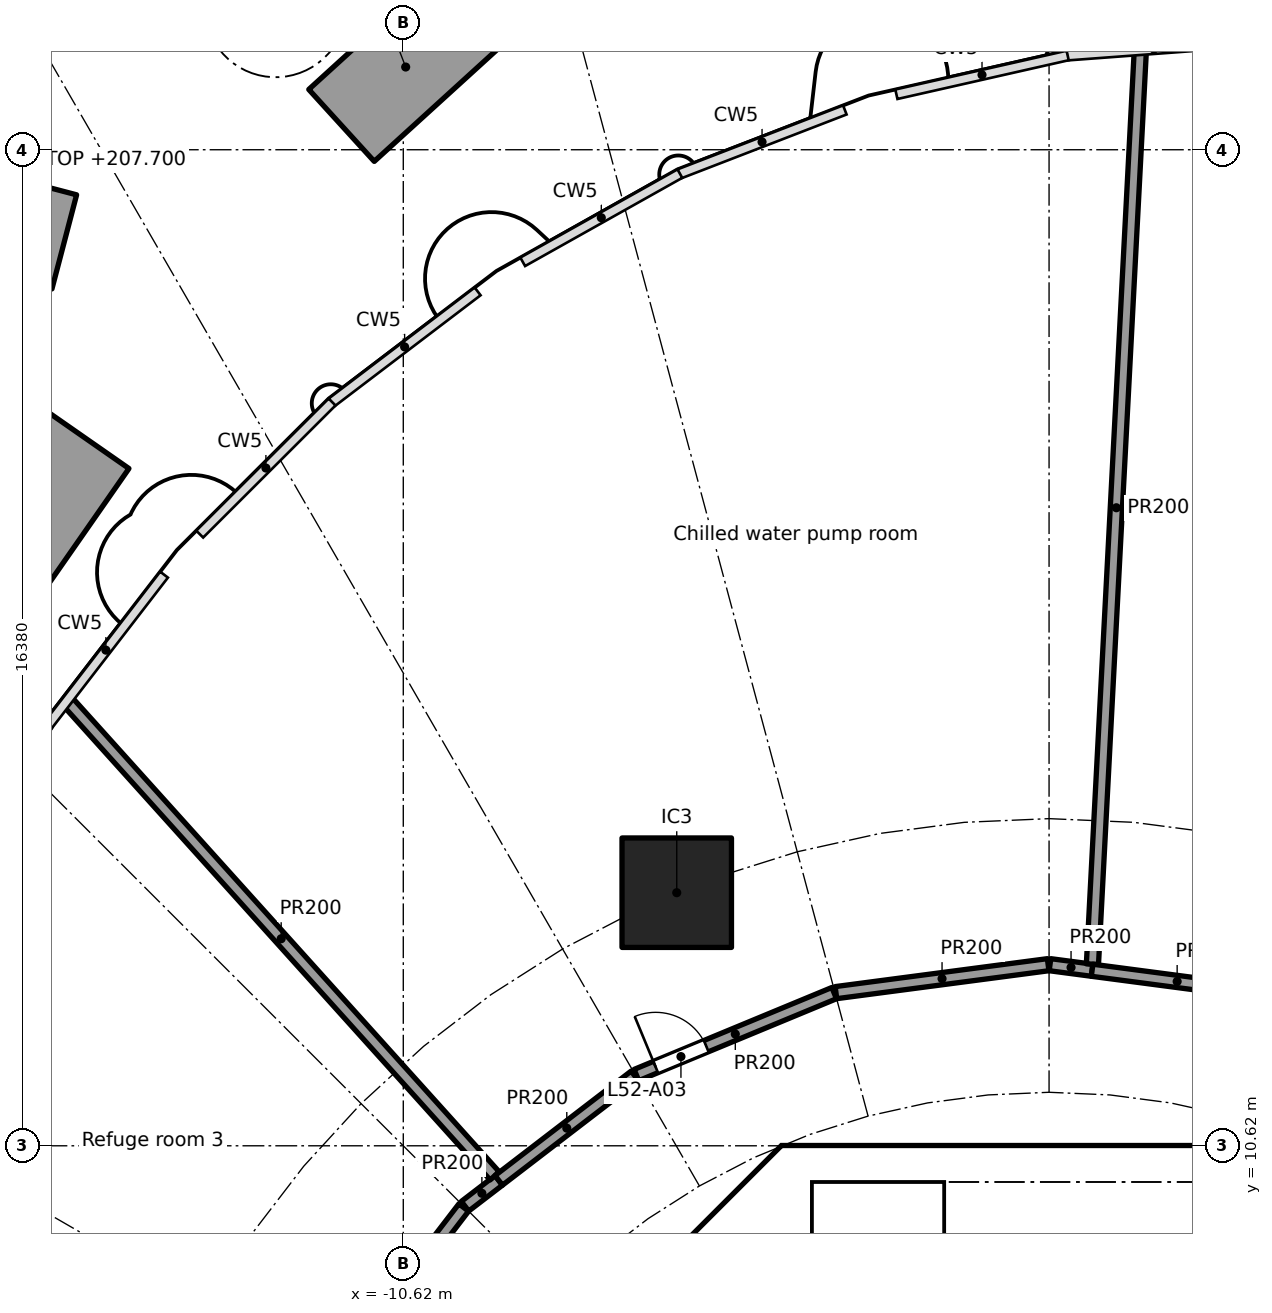
"""IFC4 building model, lengths in metres.
Left out: names, types, materials, properties, quantities, classifications, styles, units other than length and angle.
Written with IfcOpenShell. Run it as: python <this file> out.ifc"""

import sys

from ifc_helpers import new_model, si_unit, direction, frame, frame_2d, origin, origin_2d, place, context, subcontext, project, spatial, polyline, rectangle, outline, extrude, element, fill, save


model = new_model("IFC4")
c1 = context("Model", 3, precision=1e-05, world=origin(), true_north=direction((0.0, 1.0)))
c2 = subcontext(c1, "Body", "Model", "MODEL_VIEW")
j1 = project(units=[si_unit("LENGTHUNIT", "METRE"), si_unit("PLANEANGLEUNIT", "RADIAN")], contexts=[c1])
p1 = place(None, origin())
s1 = spatial("IfcSite", under=j1, at=p1, CompositionType="ELEMENT")
p2 = place(p1, origin())
s2 = spatial("IfcBuilding", under=s1, at=p2, CompositionType="ELEMENT")
p3 = place(p2, frame((0.0, 0.0, 206.6)))
s3 = spatial("IfcBuildingStorey", under=s2, at=p3, CompositionType="ELEMENT", Elevation=206.6)
p4 = place(p3, frame((-6.123, 14.782, 0.0), z_axis=(0.0, 0.0, 1.0), x_axis=(1.0, 0.0, 0.0)))
e1 = element("IfcColumn", 1, at=p4, inside=s3, PredefinedType="COLUMN", context=c2, shape_type="SweptSolid", body=[
    extrude(rectangle(XDim=1.8, YDim=1.8, at=origin_2d()), origin(), (0.0, 0.0, 1.0), 5.6),
])
p5 = place(p3, frame((-15.788, 22.215, 0.0), z_axis=(0.0, 0.0, 1.0), x_axis=(-0.571584522967, -0.82054319393, 0.0)))
e2 = element("IfcWall", 2, at=p5, inside=s3, PredefinedType="SOLIDWALL", context=c2, shape_type="SweptSolid", body=[
    extrude(rectangle(XDim=8.183, YDim=1.6, at=frame_2d((4.091, 0.0))), origin(), (0.0, 0.0, 1.0), 1.1),
])
p6 = place(p3, frame((-11.636, 27.4, 0.0), z_axis=(0.0, 0.0, 1.0), x_axis=(0.739607022458, 0.673038967914, 0.0)))
e3 = element("IfcWall", 3, at=p6, inside=s3, PredefinedType="SOLIDWALL", context=c2, shape_type="SweptSolid", body=[
    extrude(rectangle(XDim=2.853, YDim=1.6, at=frame_2d((1.427, 0.0))), origin(), (0.0, 0.0, 1.0), 1.1),
])
p7 = place(p3, frame((-17.514, 25.831, 0.0), z_axis=(0.0, 0.0, 1.0), x_axis=(0.96726449212, -0.253770373141, 0.0)))
e4 = element("IfcWall", 4, at=p7, inside=s3, PredefinedType="SOLIDWALL", context=c2, shape_type="SweptSolid", body=[
    extrude(rectangle(XDim=1.363, YDim=1.6, at=frame_2d((0.682, 0.0))), origin(), (0.0, 0.0, 1.0), 1.1),
])
p8 = place(p3, frame((-4.613, 9.988, 0.0), z_axis=(0.0, 0.0, 1.0), x_axis=(-0.707106781187, -0.707106781187, 0.0)))
e5 = element("IfcWall", 5, at=p8, inside=s3, PredefinedType="SHEAR", context=c2, shape_type="SweptSolid", body=[
    extrude(rectangle(XDim=7.602, YDim=0.6, at=frame_2d((3.801, 0.0))), origin(), (0.0, 0.0, 1.0), 5.34),
])
p9 = place(p8, frame((0.351, 0.0, 0.0)))
e6 = element("IfcOpeningElement", 6, at=p9, cuts=e5, PredefinedType="OPENING", context=c2, shape_type="SweptSolid", body=[
    extrude(rectangle(XDim=1.1, YDim=2.1, at=frame_2d((0.55, 1.05))), frame((0.0, 0.31, 0.0), z_axis=(0.0, -1.0, 0.0), x_axis=(1.0, 0.0, 0.0)), (0.0, 0.0, 1.0), 0.62),
])
p10 = place(p3, origin())
e7 = element("IfcWall", 7, at=p10, inside=s3, PredefinedType="SHEAR", context=c2, shape_type="SweptSolid", body=[
    extrude(outline(polyline([(-4.152, 10.025), (-4.401, 9.776), (-4.825, 10.2), (-4.401, 10.625), (4.401, 10.625), (4.825, 10.2), (4.401, 9.776), (4.152, 10.025), (-4.152, 10.025)])), origin(), (0.0, 0.0, 1.0), 5.34),
])
p11 = place(p3, origin())
e8 = element("IfcWall", 8, at=p11, inside=s3, PredefinedType="SOLIDWALL", context=c2, shape_type="SweptSolid", body=[
    extrude(outline(polyline([(-3.9, 7.025), (-4.1, 7.025), (-4.1, 10.025), (-3.9, 10.025), (-3.9, 7.025)])), origin(), (0.0, 0.0, 1.0), 5.34),
])
p12 = place(p3, frame((-11.769, 6.812, 0.0), z_axis=(0.0, 0.0, 1.0), x_axis=(0.608697977542, 0.793402024283, 0.0)))
e9 = element("IfcWall", 9, at=p12, inside=s3, PredefinedType="PARTITIONING", context=c2, shape_type="SweptSolid", body=[
    extrude(rectangle(XDim=3.52, YDim=0.2, at=frame_2d((1.76, 0.0))), origin(), (0.0, 0.0, 1.0), 5.34),
])
p13 = place(p12, frame((1.16, 0.0, 0.0)))
e10 = element("IfcOpeningElement", 10, at=p13, cuts=e9, PredefinedType="OPENING", context=c2, shape_type="SweptSolid", body=[
    extrude(rectangle(XDim=1.2, YDim=2.1, at=frame_2d((0.6, 1.05))), frame((0.0, 0.11, 0.0), z_axis=(0.0, -1.0, 0.0), x_axis=(1.0, 0.0, 0.0)), (0.0, 0.0, 1.0), 0.22),
])
p14 = place(p3, frame((-9.605, 9.626, 0.0), z_axis=(0.0, 0.0, 1.0), x_axis=(0.793454504248, 0.608629566887, 0.0)))
e11 = element("IfcWall", 11, at=p14, inside=s3, PredefinedType="PARTITIONING", context=c2, shape_type="SweptSolid", body=[
    extrude(rectangle(XDim=0.699, YDim=0.2, at=frame_2d((0.349, 0.0))), origin(), (0.0, 0.0, 1.0), 5.34),
])
p15 = place(p3, frame((-9.117, 10.126, 0.0), z_axis=(0.0, 0.0, 1.0), x_axis=(-0.66912025522, 0.743154145554, 0.0)))
e12 = element("IfcWall", 12, at=p15, inside=s3, PredefinedType="PARTITIONING", context=c2, shape_type="SweptSolid", body=[
    extrude(rectangle(XDim=10.493, YDim=0.2, at=frame_2d((5.247, 0.0))), origin(), (0.0, 0.0, 1.0), 5.34),
])
p16 = place(p3, frame((-9.05, 10.051, 0.0), z_axis=(0.0, 0.0, 1.0), x_axis=(0.793389024662, 0.608714921409, 0.0)))
e13 = element("IfcWall", 13, at=p16, inside=s3, PredefinedType="PARTITIONING", context=c2, shape_type="SweptSolid", body=[
    extrude(rectangle(XDim=2.821, YDim=0.2, at=frame_2d((1.411, 0.0))), origin(), (0.0, 0.0, 1.0), 5.34),
])
p17 = place(p3, frame((-6.786, 11.784, 0.0), z_axis=(0.0, 0.0, 1.0), x_axis=(0.92386297064, 0.382723413813, 0.0)))
e14 = element("IfcWall", 14, at=p17, inside=s3, PredefinedType="PARTITIONING", context=c2, shape_type="SweptSolid", body=[
    extrude(rectangle(XDim=3.52, YDim=0.2, at=frame_2d((1.76, 0.0))), origin(), (0.0, 0.0, 1.0), 5.34),
])
p18 = place(p17, frame((0.342, 0.0, 0.0)))
e15 = element("IfcOpeningElement", 15, at=p18, cuts=e14, PredefinedType="OPENING", context=c2, shape_type="SweptSolid", body=[
    extrude(rectangle(XDim=0.9, YDim=2.1, at=frame_2d((0.45, 1.05))), frame((0.0, 0.11, 0.0), z_axis=(0.0, -1.0, 0.0), x_axis=(1.0, 0.0, 0.0)), (0.0, 0.0, 1.0), 0.22),
])
p19 = place(p3, frame((-3.505, 13.139, 0.0), z_axis=(0.0, 0.0, 1.0), x_axis=(0.991452406768, 0.130468866457, 0.0)))
e16 = element("IfcWall", 16, at=p19, inside=s3, PredefinedType="PARTITIONING", context=c2, shape_type="SweptSolid", body=[
    extrude(rectangle(XDim=3.52, YDim=0.2, at=frame_2d((1.76, 0.0))), origin(), (0.0, 0.0, 1.0), 5.34),
])
p20 = place(p3, frame((0.015, 13.598, 0.0), z_axis=(0.0, 0.0, 1.0), x_axis=(0.991473310532, -0.130309917135, 0.0)))
e17 = element("IfcWall", 17, at=p20, inside=s3, PredefinedType="PARTITIONING", context=c2, shape_type="SweptSolid", body=[
    extrude(rectangle(XDim=0.699, YDim=0.2, at=frame_2d((0.349, 0.0))), origin(), (0.0, 0.0, 1.0), 5.34),
])
p21 = place(p3, frame((0.713, 13.607, 0.0), z_axis=(0.0, 0.0, 1.0), x_axis=(0.052330372828, 0.998629827353, 0.0)))
e18 = element("IfcWall", 18, at=p21, inside=s3, PredefinedType="PARTITIONING", context=c2, shape_type="SweptSolid", body=[
    extrude(rectangle(XDim=15.032, YDim=0.2, at=frame_2d((7.516, 0.0))), origin(), (0.0, 0.0, 1.0), 5.34),
])
p22 = place(p3, frame((0.708, 13.507, 0.0), z_axis=(0.0, 0.0, 1.0), x_axis=(0.991447224467, -0.130508241489, 0.0)))
e19 = element("IfcWall", 19, at=p22, inside=s3, PredefinedType="PARTITIONING", context=c2, shape_type="SweptSolid", body=[
    extrude(rectangle(XDim=2.821, YDim=0.2, at=frame_2d((1.411, 0.0))), origin(), (0.0, 0.0, 1.0), 5.34),
])
p23 = place(p9, origin())
e20 = element("IfcDoor", 20, at=p23, inside=s3, OperationType="SINGLE_SWING_LEFT", PredefinedType="DOOR", context=c2, shape_type="SweptSolid", body=[
    extrude(rectangle(XDim=1.1, YDim=2.1, at=frame_2d((0.55, 1.05))), frame((0.0, 0.025, 0.0), z_axis=(0.0, -1.0, 0.0), x_axis=(1.0, 0.0, 0.0)), (0.0, 0.0, 1.0), 0.05),
])
fill(e6, e20)
p24 = place(p18, origin())
e21 = element("IfcDoor", 21, at=p24, inside=s3, OperationType="SINGLE_SWING_LEFT", PredefinedType="DOOR", context=c2, shape_type="SweptSolid", body=[
    extrude(rectangle(XDim=0.9, YDim=2.1, at=frame_2d((0.45, 1.05))), frame((0.0, 0.025, 0.0), z_axis=(0.0, -1.0, 0.0), x_axis=(1.0, 0.0, 0.0)), (0.0, 0.0, 1.0), 0.05),
])
fill(e15, e21)
save(model, sys.argv[1])
